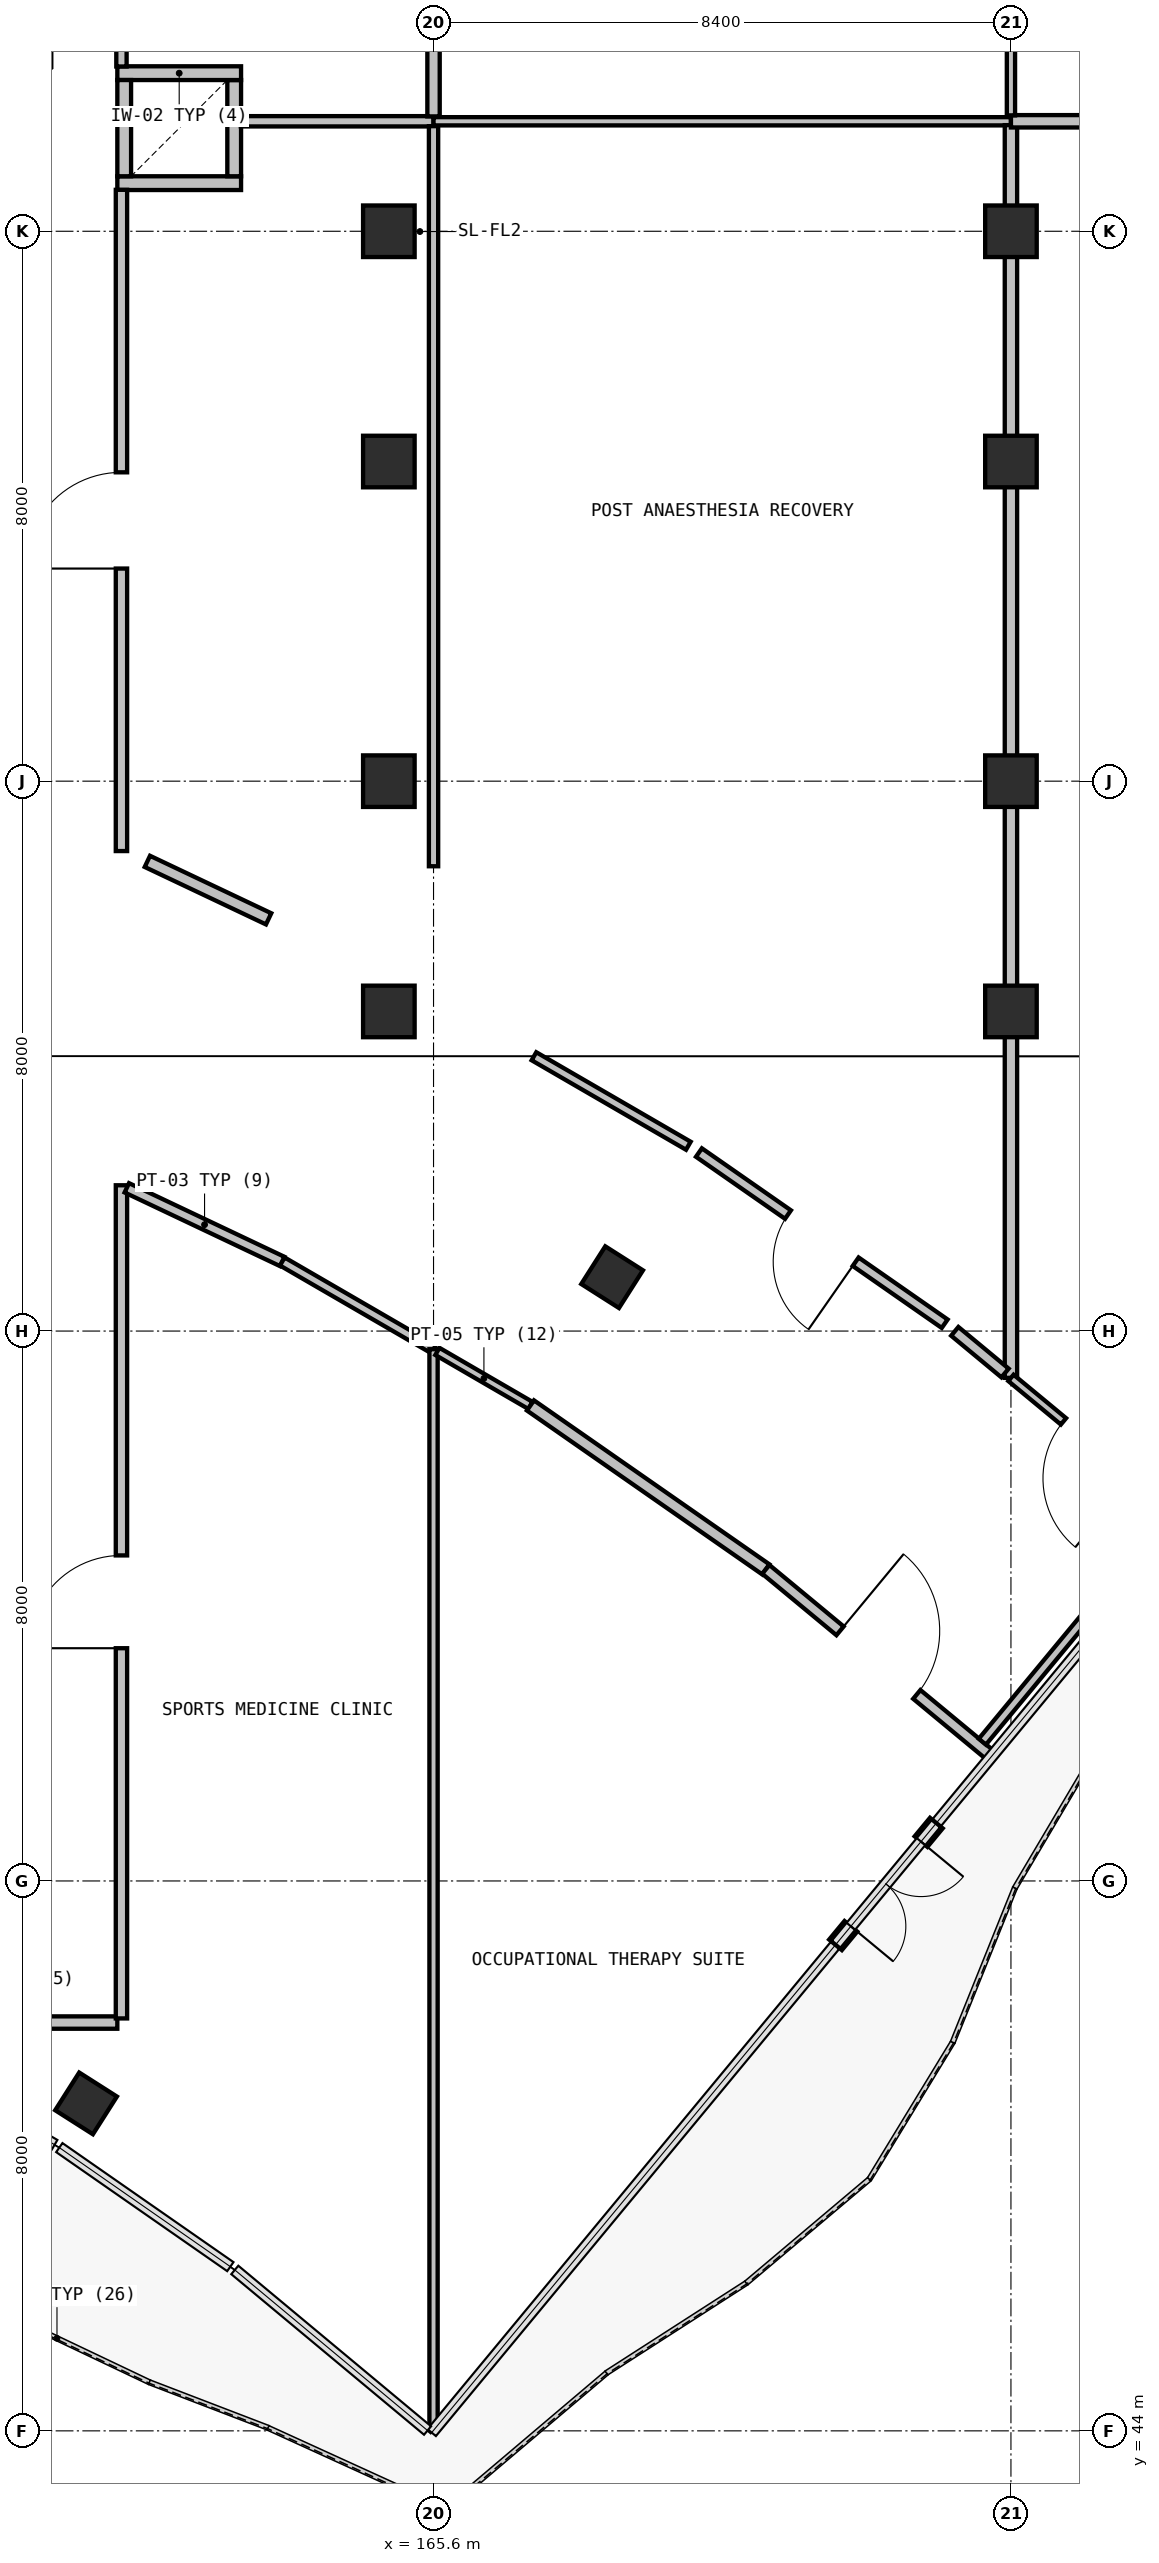
"""IFC4 building model, lengths in metres.
Left out: names, types, materials, properties, quantities, classifications, styles, units other than length and angle.
Written with IfcOpenShell. Run it as: python <this file> out.ifc"""

import sys

from ifc_helpers import new_model, si_unit, direction, frame, frame_2d, origin, origin_2d, place, context, subcontext, project, spatial, rectangle, extrude, element, fill, save


model = new_model("IFC4")
c1 = context("Model", 3, precision=1e-05, world=origin(), true_north=direction((0.0, 1.0)))
c2 = subcontext(c1, "Body", "Model", "MODEL_VIEW")
j1 = project(units=[si_unit("LENGTHUNIT", "METRE"), si_unit("PLANEANGLEUNIT", "RADIAN")], contexts=[c1])
p1 = place(None, origin())
s1 = spatial("IfcSite", under=j1, at=p1, CompositionType="ELEMENT")
p2 = place(p1, origin())
s2 = spatial("IfcBuilding", under=s1, at=p2, CompositionType="ELEMENT")
p3 = place(p2, frame((0.0, 0.0, 10.2)))
s3 = spatial("IfcBuildingStorey", under=s2, at=p3, CompositionType="ELEMENT", Elevation=10.2)
for number, where, z_axis, x_axis in (
    (1, (164.95, 64.65, 0.0), (0.0, 0.0, 1.0), (1.0, 0.0, 0.0)),
    (2, (164.95, 68.0, 0.0), (0.0, 0.0, 1.0), (1.0, 0.0, 0.0)),
    (3, (164.95, 72.65, 0.0), (0.0, 0.0, 1.0), (1.0, 0.0, 0.0)),
    (4, (164.95, 76.0, 0.0), (0.0, 0.0, 1.0), (1.0, 0.0, 0.0)),
    (5, (174.0, 64.65, 0.0), (0.0, 0.0, 1.0), (1.0, 0.0, 0.0)),
    (6, (174.0, 68.0, 0.0), (0.0, 0.0, 1.0), (1.0, 0.0, 0.0)),
    (7, (174.0, 72.65, 0.0), (0.0, 0.0, 1.0), (1.0, 0.0, 0.0)),
    (8, (174.0, 76.0, 0.0), (0.0, 0.0, 1.0), (1.0, 0.0, 0.0)),
):
    element("IfcColumn", number, at=place(p3, frame(where, z_axis=z_axis, x_axis=x_axis)), inside=s3, PredefinedType="COLUMN", context=c2, shape_type="SweptSolid", body=[
        extrude(rectangle(XDim=0.75, YDim=0.75, at=origin_2d()), origin(), (0.0, 0.0, 1.0), 4.8),
    ])
for number, where, z_axis, x_axis in (
    (9, (168.198, 60.784, 0.0), (0.0, 0.0, 1.0), (0.537, 0.844, 0.0)),
    (10, (160.545, 48.764, 0.0), (0.0, 0.0, 1.0), (0.537, 0.844, 0.0)),
):
    element("IfcColumn", number, at=place(p3, frame(where, z_axis=z_axis, x_axis=x_axis)), inside=s3, PredefinedType="COLUMN", context=c2, shape_type="SweptSolid", body=[
        extrude(rectangle(XDim=0.65, YDim=0.65, at=origin_2d()), origin(), (0.0, 0.0, 1.0), 4.8),
    ])
p4 = place(p3, frame((172.915, 52.842, 0.0), z_axis=(0.0, 0.0, 1.0), x_axis=(-0.637926137679, -0.770097554123, 0.0)))
e11 = element("IfcWall", 11, at=p4, inside=s3, PredefinedType="SOLIDWALL", context=c2, shape_type="SweptSolid", body=[
    extrude(rectangle(XDim=2.3, YDim=0.24, at=frame_2d((1.15, 0.0))), origin(), (0.0, 0.0, 1.0), 2.32),
])
p5 = place(p4, frame((0.35, 0.0, 0.0)))
e12 = element("IfcOpeningElement", 12, at=p5, cuts=e11, PredefinedType="OPENING", context=c2, shape_type="SweptSolid", body=[
    extrude(rectangle(XDim=1.6, YDim=2.2, at=frame_2d((0.8, 1.1))), frame((0.0, 0.13, 0.0), z_axis=(0.0, -1.0, 0.0), x_axis=(1.0, 0.0, 0.0)), (0.0, 0.0, 1.0), 0.26),
])
p6 = place(p3, frame((161.0, 76.7, 0.0), z_axis=(0.0, 0.0, 1.0), x_axis=(1.0, 0.0, 0.0)))
e13 = element("IfcWall", 13, at=p6, inside=s3, PredefinedType="SOLIDWALL", context=c2, shape_type="SweptSolid", body=[
    extrude(rectangle(XDim=1.8, YDim=0.2, at=frame_2d((0.9, 0.0))), origin(), (0.0, 0.0, 1.0), 4.46),
])
p7 = place(p3, frame((162.7, 76.8, 0.0), z_axis=(0.0, 0.0, 1.0), x_axis=(0.0, 1.0, 0.0)))
e14 = element("IfcWall", 14, at=p7, inside=s3, PredefinedType="SOLIDWALL", context=c2, shape_type="SweptSolid", body=[
    extrude(rectangle(XDim=1.4, YDim=0.2, at=frame_2d((0.7, 0.0))), origin(), (0.0, 0.0, 1.0), 4.46),
])
p8 = place(p3, frame((162.8, 78.3, 0.0), z_axis=(0.0, 0.0, 1.0), x_axis=(-1.0, 0.0, 0.0)))
e15 = element("IfcWall", 15, at=p8, inside=s3, PredefinedType="SOLIDWALL", context=c2, shape_type="SweptSolid", body=[
    extrude(rectangle(XDim=1.8, YDim=0.2, at=frame_2d((0.9, 0.0))), origin(), (0.0, 0.0, 1.0), 4.46),
])
p9 = place(p3, frame((161.1, 78.2, 0.0), z_axis=(0.0, 0.0, 1.0), x_axis=(0.0, -1.0, 0.0)))
e16 = element("IfcWall", 16, at=p9, inside=s3, PredefinedType="SOLIDWALL", context=c2, shape_type="SweptSolid", body=[
    extrude(rectangle(XDim=1.4, YDim=0.2, at=frame_2d((0.7, 0.0))), origin(), (0.0, 0.0, 1.0), 4.46),
])
p10 = place(p3, frame((157.596, 49.94, 0.0), z_axis=(0.0, 0.0, 1.0), x_axis=(1.0, 0.0, 0.0)))
e17 = element("IfcWall", 17, at=p10, inside=s3, PredefinedType="PARTITIONING", context=c2, shape_type="SweptSolid", body=[
    extrude(rectangle(XDim=3.404, YDim=0.18, at=frame_2d((1.702, 0.0))), origin(), (0.0, 0.0, 1.0), 4.46),
])
p11 = place(p3, frame((161.06, 50.0, 0.0), z_axis=(0.0, 0.0, 1.0), x_axis=(0.0, 1.0, 0.0)))
e18 = element("IfcWall", 18, at=p11, inside=s3, PredefinedType="PARTITIONING", context=c2, shape_type="SweptSolid", body=[
    extrude(rectangle(XDim=12.121, YDim=0.165, at=frame_2d((6.061, 0.0))), origin(), (0.0, 0.0, 1.0), 4.46),
])
p12 = place(p11, frame((5.386, 0.0, 0.0)))
e19 = element("IfcOpeningElement", 19, at=p12, cuts=e18, PredefinedType="OPENING", context=c2, shape_type="SweptSolid", body=[
    extrude(rectangle(XDim=1.35, YDim=2.15, at=frame_2d((0.675, 1.075))), frame((0.0, 0.093, 0.0), z_axis=(0.0, -1.0, 0.0), x_axis=(1.0, 0.0, 0.0)), (0.0, 0.0, 1.0), 0.185),
])
p13 = place(p3, frame((161.138, 62.084, 0.0), z_axis=(0.0, 0.0, 1.0), x_axis=(0.903650436863, -0.42827081147, 0.0)))
e20 = element("IfcWall", 20, at=p13, inside=s3, PredefinedType="PARTITIONING", context=c2, shape_type="SweptSolid", body=[
    extrude(rectangle(XDim=2.503, YDim=0.15, at=frame_2d((1.251, 0.0))), origin(), (0.0, 0.0, 1.0), 4.46),
])
p14 = place(p3, frame((163.4, 61.012, 0.0), z_axis=(0.0, 0.0, 1.0), x_axis=(0.865071180383, -0.501649133231, 0.0)))
e21 = element("IfcWall", 21, at=p14, inside=s3, PredefinedType="PARTITIONING", context=c2, shape_type="SweptSolid", body=[
    extrude(rectangle(XDim=2.543, YDim=0.135, at=frame_2d((1.272, 0.0))), origin(), (0.0, 0.0, 1.0), 4.46),
])
p15 = place(p3, frame((165.6, 59.736, 0.0), z_axis=(0.0, 0.0, 1.0), x_axis=(0.0, -1.0, 0.0)))
e22 = element("IfcWall", 22, at=p15, inside=s3, PredefinedType="PARTITIONING", context=c2, shape_type="SweptSolid", body=[
    extrude(rectangle(XDim=15.71, YDim=0.12, at=frame_2d((7.855, 0.0))), origin(), (0.0, 0.0, 1.0), 4.46),
])
p16 = place(p3, frame((163.201, 65.997, 0.0), z_axis=(0.0, 0.0, 1.0), x_axis=(-0.903658874167, 0.428253008325, 0.0)))
e23 = element("IfcWall", 23, at=p16, inside=s3, PredefinedType="PARTITIONING", context=c2, shape_type="SweptSolid", body=[
    extrude(rectangle(XDim=1.952, YDim=0.18, at=frame_2d((0.976, 0.0))), origin(), (0.0, 0.0, 1.0), 4.46),
])
p17 = place(p3, frame((161.06, 66.983, 0.0), z_axis=(0.0, 0.0, 1.0), x_axis=(0.0, 1.0, 0.0)))
e24 = element("IfcWall", 24, at=p17, inside=s3, PredefinedType="PARTITIONING", context=c2, shape_type="SweptSolid", body=[
    extrude(rectangle(XDim=9.62, YDim=0.165, at=frame_2d((4.81, 0.0))), origin(), (0.0, 0.0, 1.0), 4.46),
])
p18 = place(p17, frame((4.11, 0.0, 0.0)))
e25 = element("IfcOpeningElement", 25, at=p18, cuts=e24, PredefinedType="OPENING", context=c2, shape_type="SweptSolid", body=[
    extrude(rectangle(XDim=1.4, YDim=2.15, at=frame_2d((0.7, 1.075))), frame((0.0, 0.093, 0.0), z_axis=(0.0, -1.0, 0.0), x_axis=(1.0, 0.0, 0.0)), (0.0, 0.0, 1.0), 0.185),
])
p19 = place(p3, frame((162.797, 77.6, 0.0), z_axis=(0.0, 0.0, 1.0), x_axis=(1.0, 0.0, 0.0)))
e26 = element("IfcWall", 26, at=p19, inside=s3, PredefinedType="PARTITIONING", context=c2, shape_type="SweptSolid", body=[
    extrude(rectangle(XDim=2.803, YDim=0.15, at=frame_2d((1.401, 0.0))), origin(), (0.0, 0.0, 1.0), 4.46),
])
p20 = place(p3, frame((165.6, 77.529, 0.0), z_axis=(0.0, 0.0, 1.0), x_axis=(0.0, -1.0, 0.0)))
e27 = element("IfcWall", 27, at=p20, inside=s3, PredefinedType="PARTITIONING", context=c2, shape_type="SweptSolid", body=[
    extrude(rectangle(XDim=10.767, YDim=0.135, at=frame_2d((5.384, 0.0))), origin(), (0.0, 0.0, 1.0), 4.46),
])
p21 = place(p3, frame((165.656, 59.704, 0.0), z_axis=(0.0, 0.0, 1.0), x_axis=(0.864806420331, -0.502105422551, 0.0)))
e28 = element("IfcWall", 28, at=p21, inside=s3, PredefinedType="PARTITIONING", context=c2, shape_type="SweptSolid", body=[
    extrude(rectangle(XDim=1.566, YDim=0.12, at=frame_2d((0.783, 0.0))), origin(), (0.0, 0.0, 1.0), 4.46),
])
p22 = place(p3, frame((167.01, 58.918, 0.0), z_axis=(0.0, 0.0, 1.0), x_axis=(0.820562806153, -0.571556367437, 0.0)))
e29 = element("IfcWall", 29, at=p22, inside=s3, PredefinedType="PARTITIONING", context=c2, shape_type="SweptSolid", body=[
    extrude(rectangle(XDim=4.173, YDim=0.18, at=frame_2d((2.086, 0.0))), origin(), (0.0, 0.0, 1.0), 4.46),
])
p23 = place(p3, frame((170.434, 56.533, 0.0), z_axis=(0.0, 0.0, 1.0), x_axis=(0.770184287696, -0.637821419353, 0.0)))
e30 = element("IfcWall", 30, at=p23, inside=s3, PredefinedType="PARTITIONING", context=c2, shape_type="SweptSolid", body=[
    extrude(rectangle(XDim=4.253, YDim=0.165, at=frame_2d((2.127, 0.0))), origin(), (0.0, 0.0, 1.0), 4.46),
])
p24 = place(p23, frame((1.402, 0.0, 0.0)))
e31 = element("IfcOpeningElement", 31, at=p24, cuts=e30, PredefinedType="OPENING", context=c2, shape_type="SweptSolid", body=[
    extrude(rectangle(XDim=1.45, YDim=2.15, at=frame_2d((0.725, 1.075))), frame((0.0, 0.093, 0.0), z_axis=(0.0, -1.0, 0.0), x_axis=(1.0, 0.0, 0.0)), (0.0, 0.0, 1.0), 0.185),
])
p25 = place(p3, frame((173.036, 60.107, 0.0), z_axis=(0.0, 0.0, 1.0), x_axis=(-0.820574971601, 0.571538901547, 0.0)))
e32 = element("IfcWall", 32, at=p25, inside=s3, PredefinedType="PARTITIONING", context=c2, shape_type="SweptSolid", body=[
    extrude(rectangle(XDim=4.357, YDim=0.15, at=frame_2d((2.178, 0.0))), origin(), (0.0, 0.0, 1.0), 4.46),
])
p26 = place(p25, frame((1.578, 0.0, 0.0)))
e33 = element("IfcOpeningElement", 33, at=p26, cuts=e32, PredefinedType="OPENING", context=c2, shape_type="SweptSolid", body=[
    extrude(rectangle(XDim=1.2, YDim=2.15, at=frame_2d((0.6, 1.075))), frame((0.0, 0.085, 0.0), z_axis=(0.0, -1.0, 0.0), x_axis=(1.0, 0.0, 0.0)), (0.0, 0.0, 1.0), 0.17),
])
p27 = place(p3, frame((169.307, 62.696, 0.0), z_axis=(0.0, 0.0, 1.0), x_axis=(-0.86512994763, 0.501547778097, 0.0)))
e34 = element("IfcWall", 34, at=p27, inside=s3, PredefinedType="PARTITIONING", context=c2, shape_type="SweptSolid", body=[
    extrude(rectangle(XDim=2.596, YDim=0.135, at=frame_2d((1.298, 0.0))), origin(), (0.0, 0.0, 1.0), 4.46),
])
p28 = place(p3, frame((165.6, 77.6, 0.0), z_axis=(0.0, 0.0, 1.0), x_axis=(1.0, 0.0, 0.0)))
e35 = element("IfcWall", 35, at=p28, inside=s3, PredefinedType="PARTITIONING", context=c2, shape_type="SweptSolid", body=[
    extrude(rectangle(XDim=8.4, YDim=0.12, at=frame_2d((4.2, 0.0))), origin(), (0.0, 0.0, 1.0), 4.46),
])
p29 = place(p3, frame((174.0, 77.544, 0.0), z_axis=(0.0, 0.0, 1.0), x_axis=(0.0, -1.0, 0.0)))
e36 = element("IfcWall", 36, at=p29, inside=s3, PredefinedType="PARTITIONING", context=c2, shape_type="SweptSolid", body=[
    extrude(rectangle(XDim=18.225, YDim=0.18, at=frame_2d((9.112, 0.0))), origin(), (0.0, 0.0, 1.0), 3.81),
])
p30 = place(p3, frame((173.914, 59.39, 0.0), z_axis=(0.0, 0.0, 1.0), x_axis=(-0.769736392055, 0.638361877579, 0.0)))
e37 = element("IfcWall", 37, at=p30, inside=s3, PredefinedType="PARTITIONING", context=c2, shape_type="SweptSolid", body=[
    extrude(rectangle(XDim=0.95, YDim=0.165, at=frame_2d((0.475, 0.0))), origin(), (0.0, 0.0, 1.0), 4.46),
])
p31 = place(p3, frame((173.584, 54.026, 0.0), z_axis=(0.0, 0.0, 1.0), x_axis=(0.637775393062, 0.770222401651, 0.0)))
e38 = element("IfcWall", 38, at=p31, inside=s3, PredefinedType="PARTITIONING", context=c2, shape_type="SweptSolid", body=[
    extrude(rectangle(XDim=4.282, YDim=0.135, at=frame_2d((2.141, 0.0))), origin(), (0.0, 0.0, 1.0), 4.46),
])
p32 = place(p3, frame((176.53, 57.225, 0.0), z_axis=(0.0, 0.0, 1.0), x_axis=(-0.770367879737, 0.637599662695, 0.0)))
e39 = element("IfcWall", 39, at=p32, inside=s3, PredefinedType="PARTITIONING", context=c2, shape_type="SweptSolid", body=[
    extrude(rectangle(XDim=3.284, YDim=0.12, at=frame_2d((1.642, 0.0))), origin(), (0.0, 0.0, 1.0), 4.46),
])
p33 = place(p32, frame((0.992, 0.0, 0.0)))
e40 = element("IfcOpeningElement", 40, at=p33, cuts=e39, PredefinedType="OPENING", context=c2, shape_type="SweptSolid", body=[
    extrude(rectangle(XDim=1.3, YDim=2.15, at=frame_2d((0.65, 1.075))), frame((0.0, 0.07, 0.0), z_axis=(0.0, -1.0, 0.0), x_axis=(1.0, 0.0, 0.0)), (0.0, 0.0, 1.0), 0.14),
])
p34 = place(p3, frame((174.0, 77.6, 0.0), z_axis=(0.0, 0.0, 1.0), x_axis=(1.0, 0.0, 0.0)))
e41 = element("IfcWall", 41, at=p34, inside=s3, PredefinedType="PARTITIONING", context=c2, shape_type="SweptSolid", body=[
    extrude(rectangle(XDim=7.958, YDim=0.18, at=frame_2d((3.979, 0.0))), origin(), (0.0, 0.0, 1.0), 4.46),
])
p35 = place(p3, frame((161.06, 78.397, 0.0), z_axis=(0.0, 0.0, 1.0), x_axis=(0.0, 1.0, 0.0)))
e42 = element("IfcWall", 42, at=p35, inside=s3, PredefinedType="PARTITIONING", context=c2, shape_type="SweptSolid", body=[
    extrude(rectangle(XDim=1.103, YDim=0.15, at=frame_2d((0.552, 0.0))), origin(), (0.0, 0.0, 1.0), 4.46),
])
p36 = place(p3, frame((165.6, 80.893, 0.0), z_axis=(0.0, 0.0, 1.0), x_axis=(0.0, -1.0, 0.0)))
e43 = element("IfcWall", 43, at=p36, inside=s3, PredefinedType="PARTITIONING", context=c2, shape_type="SweptSolid", body=[
    extrude(rectangle(XDim=3.222, YDim=0.18, at=frame_2d((1.611, 0.0))), origin(), (0.0, 0.0, 1.0), 4.46),
])
p37 = place(p3, frame((174.0, 105.376, 0.0), z_axis=(0.0, 0.0, 1.0), x_axis=(0.0, -1.0, 0.0)))
e44 = element("IfcWall", 44, at=p37, inside=s3, PredefinedType="PARTITIONING", context=c2, shape_type="SweptSolid", body=[
    extrude(rectangle(XDim=27.69, YDim=0.12, at=frame_2d((13.845, 0.0))), origin(), (0.0, 0.0, 1.0), 3.81),
])
p38 = place(p5, origin())
e45 = element("IfcDoor", 45, at=p38, inside=s3, OperationType="DOUBLE_DOOR_SINGLE_SWING", PredefinedType="DOOR", context=c2, shape_type="SweptSolid", body=[
    extrude(rectangle(XDim=1.6, YDim=2.2, at=frame_2d((0.8, 1.1))), frame((0.0, 0.025, 0.0), z_axis=(0.0, -1.0, 0.0), x_axis=(1.0, 0.0, 0.0)), (0.0, 0.0, 1.0), 0.05),
])
fill(e12, e45)
p39 = place(p12, origin())
e46 = element("IfcDoor", 46, at=p39, inside=s3, OperationType="SINGLE_SWING_LEFT", PredefinedType="DOOR", context=c2, shape_type="SweptSolid", body=[
    extrude(rectangle(XDim=1.35, YDim=2.15, at=frame_2d((0.675, 1.075))), frame((0.0, 0.025, 0.0), z_axis=(0.0, -1.0, 0.0), x_axis=(1.0, 0.0, 0.0)), (0.0, 0.0, 1.0), 0.05),
])
fill(e19, e46)
p40 = place(p18, origin())
e47 = element("IfcDoor", 47, at=p40, inside=s3, OperationType="SINGLE_SWING_RIGHT", PredefinedType="DOOR", context=c2, shape_type="SweptSolid", body=[
    extrude(rectangle(XDim=1.4, YDim=2.15, at=frame_2d((0.7, 1.075))), frame((0.0, 0.025, 0.0), z_axis=(0.0, -1.0, 0.0), x_axis=(1.0, 0.0, 0.0)), (0.0, 0.0, 1.0), 0.05),
])
fill(e25, e47)
p41 = place(p24, origin())
e48 = element("IfcDoor", 48, at=p41, inside=s3, OperationType="SINGLE_SWING_LEFT", PredefinedType="DOOR", context=c2, shape_type="SweptSolid", body=[
    extrude(rectangle(XDim=1.45, YDim=2.15, at=frame_2d((0.725, 1.075))), frame((0.0, 0.025, 0.0), z_axis=(0.0, -1.0, 0.0), x_axis=(1.0, 0.0, 0.0)), (0.0, 0.0, 1.0), 0.05),
])
fill(e31, e48)
p42 = place(p26, origin())
e49 = element("IfcDoor", 49, at=p42, inside=s3, OperationType="SINGLE_SWING_RIGHT", PredefinedType="DOOR", context=c2, shape_type="SweptSolid", body=[
    extrude(rectangle(XDim=1.2, YDim=2.15, at=frame_2d((0.6, 1.075))), frame((0.0, 0.025, 0.0), z_axis=(0.0, -1.0, 0.0), x_axis=(1.0, 0.0, 0.0)), (0.0, 0.0, 1.0), 0.05),
])
fill(e33, e49)
p43 = place(p33, origin())
e50 = element("IfcDoor", 50, at=p43, inside=s3, OperationType="SINGLE_SWING_LEFT", PredefinedType="DOOR", context=c2, shape_type="SweptSolid", body=[
    extrude(rectangle(XDim=1.3, YDim=2.15, at=frame_2d((0.65, 1.075))), frame((0.0, 0.025, 0.0), z_axis=(0.0, -1.0, 0.0), x_axis=(1.0, 0.0, 0.0)), (0.0, 0.0, 1.0), 0.05),
])
fill(e40, e50)
save(model, sys.argv[1])
